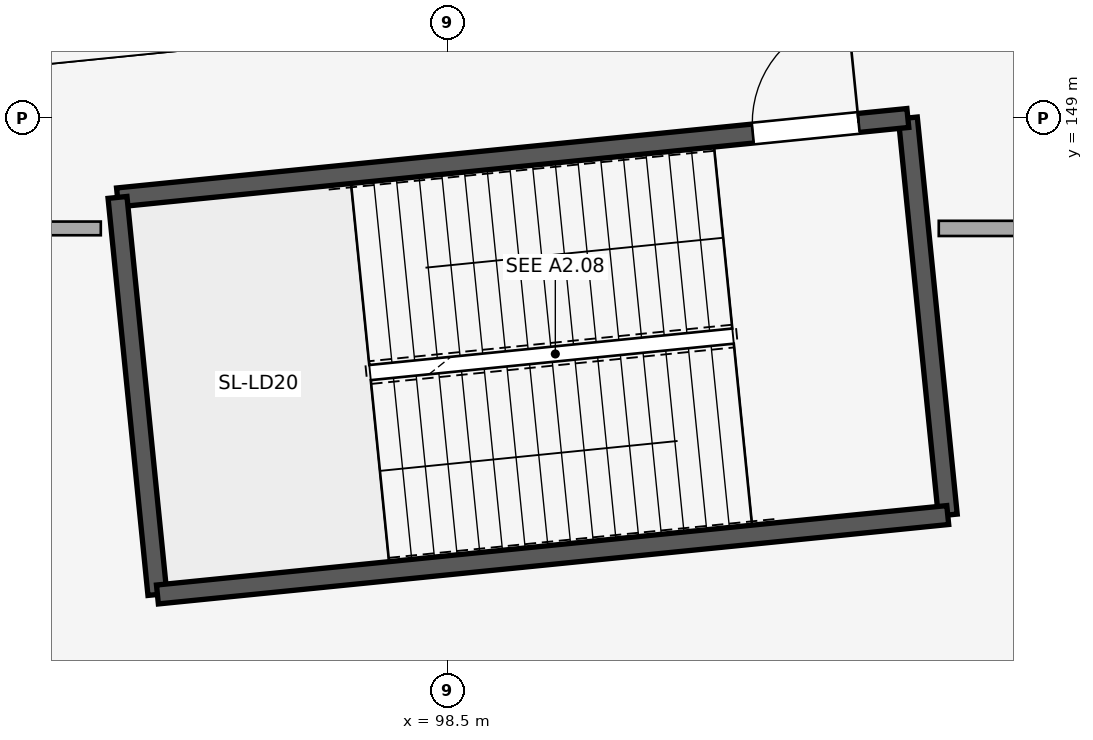
"""IFC4 building model, lengths in metres.
Left out: names, types, materials, properties, quantities, classifications, styles, units other than length and angle.
Written with IfcOpenShell. Run it as: python <this file> out.ifc"""

import sys

from ifc_helpers import new_model, si_unit, direction, frame, frame_2d, origin, place, context, subcontext, project, spatial, rectangle, extrude, element, fill, save


model = new_model("IFC4")
c1 = context("Model", 3, precision=1e-05, world=origin(), true_north=direction((0.0, 1.0)))
c2 = subcontext(c1, "Body", "Model", "MODEL_VIEW")
j1 = project(units=[si_unit("LENGTHUNIT", "METRE"), si_unit("PLANEANGLEUNIT", "RADIAN")], contexts=[c1])
p1 = place(None, origin())
s1 = spatial("IfcSite", under=j1, at=p1, CompositionType="ELEMENT")
p2 = place(p1, origin())
s2 = spatial("IfcBuilding", under=s1, at=p2, CompositionType="ELEMENT")
p3 = place(p2, origin())
s3 = spatial("IfcBuildingStorey", under=s2, at=p3, CompositionType="ELEMENT", Elevation=0.0)
p4 = place(p3, frame((105.079, 143.779, 0.0), z_axis=(0.0, 0.0, 1.0), x_axis=(-0.100028593886, 0.994984562898, 0.0)))
e1 = element("IfcWall", 1, at=p4, inside=s3, PredefinedType="SHEAR", context=c2, shape_type="SweptSolid", body=[
    extrude(rectangle(XDim=5.25, YDim=0.25, at=frame_2d((2.625, 0.0))), origin(), (0.0, 0.0, 1.0), 4.94),
])
p5 = place(p3, frame((104.553, 149.003, 0.0), z_axis=(0.0, 0.0, 1.0), x_axis=(-0.994985938948, -0.100014905366, 0.0)))
e2 = element("IfcWall", 2, at=p5, inside=s3, PredefinedType="SHEAR", context=c2, shape_type="SweptSolid", body=[
    extrude(rectangle(XDim=10.45, YDim=0.25, at=frame_2d((5.225, 0.0))), origin(), (0.0, 0.0, 1.0), 4.94),
])
p6 = place(p5, frame((0.65, 0.0, 0.0)))
e3 = element("IfcOpeningElement", 3, at=p6, cuts=e2, PredefinedType="OPENING", context=c2, shape_type="SweptSolid", body=[
    extrude(rectangle(XDim=1.4, YDim=2.2, at=frame_2d((0.7, 1.1))), frame((0.0, 0.135, 0.0), z_axis=(0.0, -1.0, 0.0), x_axis=(1.0, 0.0, 0.0)), (0.0, 0.0, 1.0), 0.27),
])
p7 = place(p3, frame((94.156, 147.958, 0.0), z_axis=(0.0, 0.0, 1.0), x_axis=(0.100028593886, -0.994984562898, 0.0)))
e4 = element("IfcWall", 4, at=p7, inside=s3, PredefinedType="SHEAR", context=c2, shape_type="SweptSolid", body=[
    extrude(rectangle(XDim=5.25, YDim=0.25, at=frame_2d((2.625, 0.0))), origin(), (0.0, 0.0, 1.0), 4.94),
])
p8 = place(p3, frame((94.681, 142.734, 0.0), z_axis=(0.0, 0.0, 1.0), x_axis=(0.994985938948, 0.100014905366, 0.0)))
e5 = element("IfcWall", 5, at=p8, inside=s3, PredefinedType="SHEAR", context=c2, shape_type="SweptSolid", body=[
    extrude(rectangle(XDim=10.45, YDim=0.25, at=frame_2d((5.225, 0.0))), origin(), (0.0, 0.0, 1.0), 4.94),
])
p9 = place(p3, frame((74.585, 147.55, 0.0), z_axis=(0.0, 0.0, 1.0), x_axis=(1.0, 0.0, 0.0)))
e6 = element("IfcWall", 6, at=p9, inside=s3, PredefinedType="PARTITIONING", context=c2, shape_type="SweptSolid", body=[
    extrude(rectangle(XDim=19.351, YDim=0.18, at=frame_2d((9.675, 0.0))), origin(), (0.0, 0.0, 1.0), 3.69),
])
p10 = place(p9, frame((16.5, 0.0, 0.0)))
e7 = element("IfcOpeningElement", 7, at=p10, cuts=e6, PredefinedType="OPENING", context=c2, shape_type="SweptSolid", body=[
    extrude(rectangle(XDim=1.16, YDim=2.38, at=frame_2d((0.58, 1.19))), frame((0.0, 0.1, 0.0), z_axis=(0.0, -1.0, 0.0), x_axis=(1.0, 0.0, 0.0)), (0.0, 0.0, 1.0), 0.2),
])
p11 = place(p3, frame((104.96, 147.55, 0.0), z_axis=(0.0, 0.0, 1.0), x_axis=(1.0, 0.0, 0.0)))
e8 = element("IfcWall", 8, at=p11, inside=s3, PredefinedType="PARTITIONING", context=c2, shape_type="SweptSolid", body=[
    extrude(rectangle(XDim=12.079, YDim=0.2, at=frame_2d((6.04, 0.0))), origin(), (0.0, 0.0, 1.0), 3.69),
])
p12 = place(p11, frame((8.729, 0.0, 0.0)))
e9 = element("IfcOpeningElement", 9, at=p12, cuts=e8, PredefinedType="OPENING", context=c2, shape_type="SweptSolid", body=[
    extrude(rectangle(XDim=1.24, YDim=2.1, at=frame_2d((0.62, 1.05))), frame((0.0, 0.11, 0.0), z_axis=(0.0, -1.0, 0.0), x_axis=(1.0, 0.0, 0.0)), (0.0, 0.0, 1.0), 0.22),
])
p13 = place(p6, frame((1.4, 0.0, 0.0), z_axis=(0.0, 0.0, 1.0), x_axis=(-1.0, 0.0, 0.0)))
e10 = element("IfcDoor", 10, at=p13, inside=s3, OperationType="SINGLE_SWING_RIGHT", PredefinedType="DOOR", context=c2, shape_type="SweptSolid", body=[
    extrude(rectangle(XDim=1.4, YDim=2.2, at=frame_2d((0.7, 1.1))), frame((0.0, 0.025, 0.0), z_axis=(0.0, -1.0, 0.0), x_axis=(1.0, 0.0, 0.0)), (0.0, 0.0, 1.0), 0.05),
])
fill(e3, e10)
save(model, sys.argv[1])
